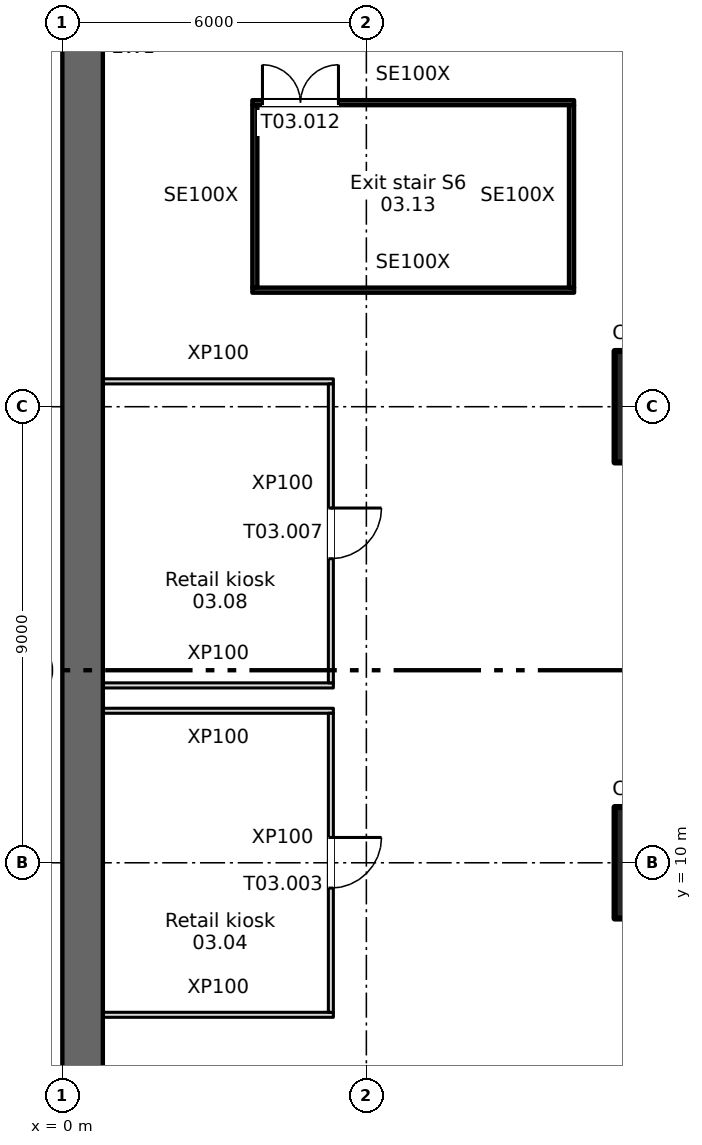
"""IFC4 building model, lengths in metres.
Left out: names, types, materials, properties, quantities, classifications, styles, units other than length and angle.
Written with IfcOpenShell. Run it as: python <this file> out.ifc"""

import sys

from ifc_helpers import new_model, si_unit, direction, frame, frame_2d, origin, origin_2d, place, context, subcontext, project, spatial, rectangle, extrude, element, fill, save


model = new_model("IFC4")
c1 = context("Model", 3, precision=1e-05, world=origin(), true_north=direction((0.0, 1.0)))
c2 = subcontext(c1, "Body", "Model", "MODEL_VIEW")
j1 = project(units=[si_unit("LENGTHUNIT", "METRE"), si_unit("PLANEANGLEUNIT", "RADIAN")], contexts=[c1])
p1 = place(None, origin())
s1 = spatial("IfcSite", under=j1, at=p1, CompositionType="ELEMENT")
p2 = place(p1, origin())
s2 = spatial("IfcBuilding", under=s1, at=p2, CompositionType="ELEMENT")
p3 = place(p2, origin())
s3 = spatial("IfcBuildingStorey", under=s2, at=p3, CompositionType="ELEMENT", Elevation=0.0)
for number, where, z_axis, x_axis in (
    (1, (12.0, 10.0, 0.0), (0.0, 0.0, 1.0), (1.0, 0.0, 0.0)),
    (2, (12.0, 19.0, 0.0), (0.0, 0.0, 1.0), (1.0, 0.0, 0.0)),
):
    element("IfcColumn", number, at=place(p3, frame(where, z_axis=z_axis, x_axis=x_axis)), inside=s3, PredefinedType="COLUMN", context=c2, shape_type="SweptSolid", body=[
        extrude(rectangle(XDim=2.2, YDim=2.2, at=origin_2d()), origin(), (0.0, 0.0, 1.0), 6.0),
    ])
p4 = place(p3, frame((0.4, 4.5, 0.0), z_axis=(0.0, 0.0, 1.0), x_axis=(0.0, 1.0, 0.0)))
e3 = element("IfcWall", 3, at=p4, inside=s3, PredefinedType="SHEAR", context=c2, shape_type="SweptSolid", body=[
    extrude(rectangle(XDim=37.0, YDim=0.8, at=frame_2d((18.5, 0.0))), origin(), (0.0, 0.0, 1.0), 6.0),
])
for number, where, z_axis, x_axis in (
    (4, (0.8, 7.0, 0.0), (0.0, 0.0, 1.0), (1.0, 0.0, 0.0)),
    (5, (0.8, 13.0, 0.0), (0.0, 0.0, 1.0), (1.0, 0.0, 0.0)),
    (6, (0.8, 13.5, 0.0), (0.0, 0.0, 1.0), (1.0, 0.0, 0.0)),
    (7, (0.8, 19.5, 0.0), (0.0, 0.0, 1.0), (1.0, 0.0, 0.0)),
):
    element("IfcWall", number, at=place(p3, frame(where, z_axis=z_axis, x_axis=x_axis)), inside=s3, PredefinedType="PARTITIONING", context=c2, shape_type="SweptSolid", body=[
        extrude(rectangle(XDim=4.55, YDim=0.1, at=frame_2d((2.275, 0.0))), origin(), (0.0, 0.0, 1.0), 6.0),
    ])
p5 = place(p3, frame((3.75, 21.3, 0.0), z_axis=(0.0, 0.0, 1.0), x_axis=(1.0, 0.0, 0.0)))
e8 = element("IfcWall", 8, at=p5, inside=s3, PredefinedType="SOLIDWALL", context=c2, shape_type="SweptSolid", body=[
    extrude(rectangle(XDim=6.35, YDim=0.1, at=frame_2d((3.175, 0.0))), origin(), (0.0, 0.0, 1.0), 6.0),
])
p6 = place(p3, frame((3.75, 25.0, 0.0), z_axis=(0.0, 0.0, 1.0), x_axis=(1.0, 0.0, 0.0)))
e9 = element("IfcWall", 9, at=p6, inside=s3, PredefinedType="SOLIDWALL", context=c2, shape_type="SweptSolid", body=[
    extrude(rectangle(XDim=6.35, YDim=0.1, at=frame_2d((3.175, 0.0))), origin(), (0.0, 0.0, 1.0), 6.0),
])
p7 = place(p6, frame((0.2, 0.0, 0.0)))
e10 = element("IfcOpeningElement", 10, at=p7, cuts=e9, PredefinedType="OPENING", context=c2, shape_type="SweptSolid", body=[
    extrude(rectangle(XDim=1.5, YDim=2.1, at=frame_2d((0.75, 1.05))), frame((0.0, 0.06, 0.0), z_axis=(0.0, -1.0, 0.0), x_axis=(1.0, 0.0, 0.0)), (0.0, 0.0, 1.0), 0.12),
])
p8 = place(p3, frame((3.8, 21.35, 0.0), z_axis=(0.0, 0.0, 1.0), x_axis=(0.0, 1.0, 0.0)))
e11 = element("IfcWall", 11, at=p8, inside=s3, PredefinedType="SOLIDWALL", context=c2, shape_type="SweptSolid", body=[
    extrude(rectangle(XDim=3.6, YDim=0.1, at=frame_2d((1.8, 0.0))), origin(), (0.0, 0.0, 1.0), 6.0),
])
p9 = place(p3, frame((5.3, 7.05, 0.0), z_axis=(0.0, 0.0, 1.0), x_axis=(0.0, 1.0, 0.0)))
e12 = element("IfcWall", 12, at=p9, inside=s3, PredefinedType="PARTITIONING", context=c2, shape_type="SweptSolid", body=[
    extrude(rectangle(XDim=5.9, YDim=0.1, at=frame_2d((2.95, 0.0))), origin(), (0.0, 0.0, 1.0), 6.0),
])
p10 = place(p9, frame((2.45, 0.0, 0.0)))
e13 = element("IfcOpeningElement", 13, at=p10, cuts=e12, PredefinedType="OPENING", context=c2, shape_type="SweptSolid", body=[
    extrude(rectangle(XDim=1.0, YDim=2.1, at=frame_2d((0.5, 1.05))), frame((0.0, 0.06, 0.0), z_axis=(0.0, -1.0, 0.0), x_axis=(1.0, 0.0, 0.0)), (0.0, 0.0, 1.0), 0.12),
])
p11 = place(p3, frame((5.3, 13.55, 0.0), z_axis=(0.0, 0.0, 1.0), x_axis=(0.0, 1.0, 0.0)))
e14 = element("IfcWall", 14, at=p11, inside=s3, PredefinedType="PARTITIONING", context=c2, shape_type="SweptSolid", body=[
    extrude(rectangle(XDim=5.9, YDim=0.1, at=frame_2d((2.95, 0.0))), origin(), (0.0, 0.0, 1.0), 6.0),
])
p12 = place(p11, frame((2.45, 0.0, 0.0)))
e15 = element("IfcOpeningElement", 15, at=p12, cuts=e14, PredefinedType="OPENING", context=c2, shape_type="SweptSolid", body=[
    extrude(rectangle(XDim=1.0, YDim=2.1, at=frame_2d((0.5, 1.05))), frame((0.0, 0.06, 0.0), z_axis=(0.0, -1.0, 0.0), x_axis=(1.0, 0.0, 0.0)), (0.0, 0.0, 1.0), 0.12),
])
p13 = place(p3, frame((10.05, 21.35, 0.0), z_axis=(0.0, 0.0, 1.0), x_axis=(0.0, 1.0, 0.0)))
e16 = element("IfcWall", 16, at=p13, inside=s3, PredefinedType="SOLIDWALL", context=c2, shape_type="SweptSolid", body=[
    extrude(rectangle(XDim=3.6, YDim=0.1, at=frame_2d((1.8, 0.0))), origin(), (0.0, 0.0, 1.0), 6.0),
])
p14 = place(p10, frame((1.0, 0.0, 0.0), z_axis=(0.0, 0.0, 1.0), x_axis=(-1.0, 0.0, 0.0)))
e17 = element("IfcDoor", 17, at=p14, inside=s3, OperationType="SINGLE_SWING_LEFT", PredefinedType="DOOR", context=c2, shape_type="SweptSolid", body=[
    extrude(rectangle(XDim=1.0, YDim=2.1, at=frame_2d((0.5, 1.05))), frame((0.0, 0.025, 0.0), z_axis=(0.0, -1.0, 0.0), x_axis=(1.0, 0.0, 0.0)), (0.0, 0.0, 1.0), 0.05),
])
fill(e13, e17)
p15 = place(p12, frame((1.0, 0.0, 0.0), z_axis=(0.0, 0.0, 1.0), x_axis=(-1.0, 0.0, 0.0)))
e18 = element("IfcDoor", 18, at=p15, inside=s3, OperationType="SINGLE_SWING_LEFT", PredefinedType="DOOR", context=c2, shape_type="SweptSolid", body=[
    extrude(rectangle(XDim=1.0, YDim=2.1, at=frame_2d((0.5, 1.05))), frame((0.0, 0.025, 0.0), z_axis=(0.0, -1.0, 0.0), x_axis=(1.0, 0.0, 0.0)), (0.0, 0.0, 1.0), 0.05),
])
fill(e15, e18)
p16 = place(p7, origin())
e19 = element("IfcDoor", 19, at=p16, inside=s3, OperationType="DOUBLE_DOOR_SINGLE_SWING", PredefinedType="DOOR", context=c2, shape_type="SweptSolid", body=[
    extrude(rectangle(XDim=1.5, YDim=2.1, at=frame_2d((0.75, 1.05))), frame((0.0, 0.025, 0.0), z_axis=(0.0, -1.0, 0.0), x_axis=(1.0, 0.0, 0.0)), (0.0, 0.0, 1.0), 0.05),
])
fill(e10, e19)
save(model, sys.argv[1])
